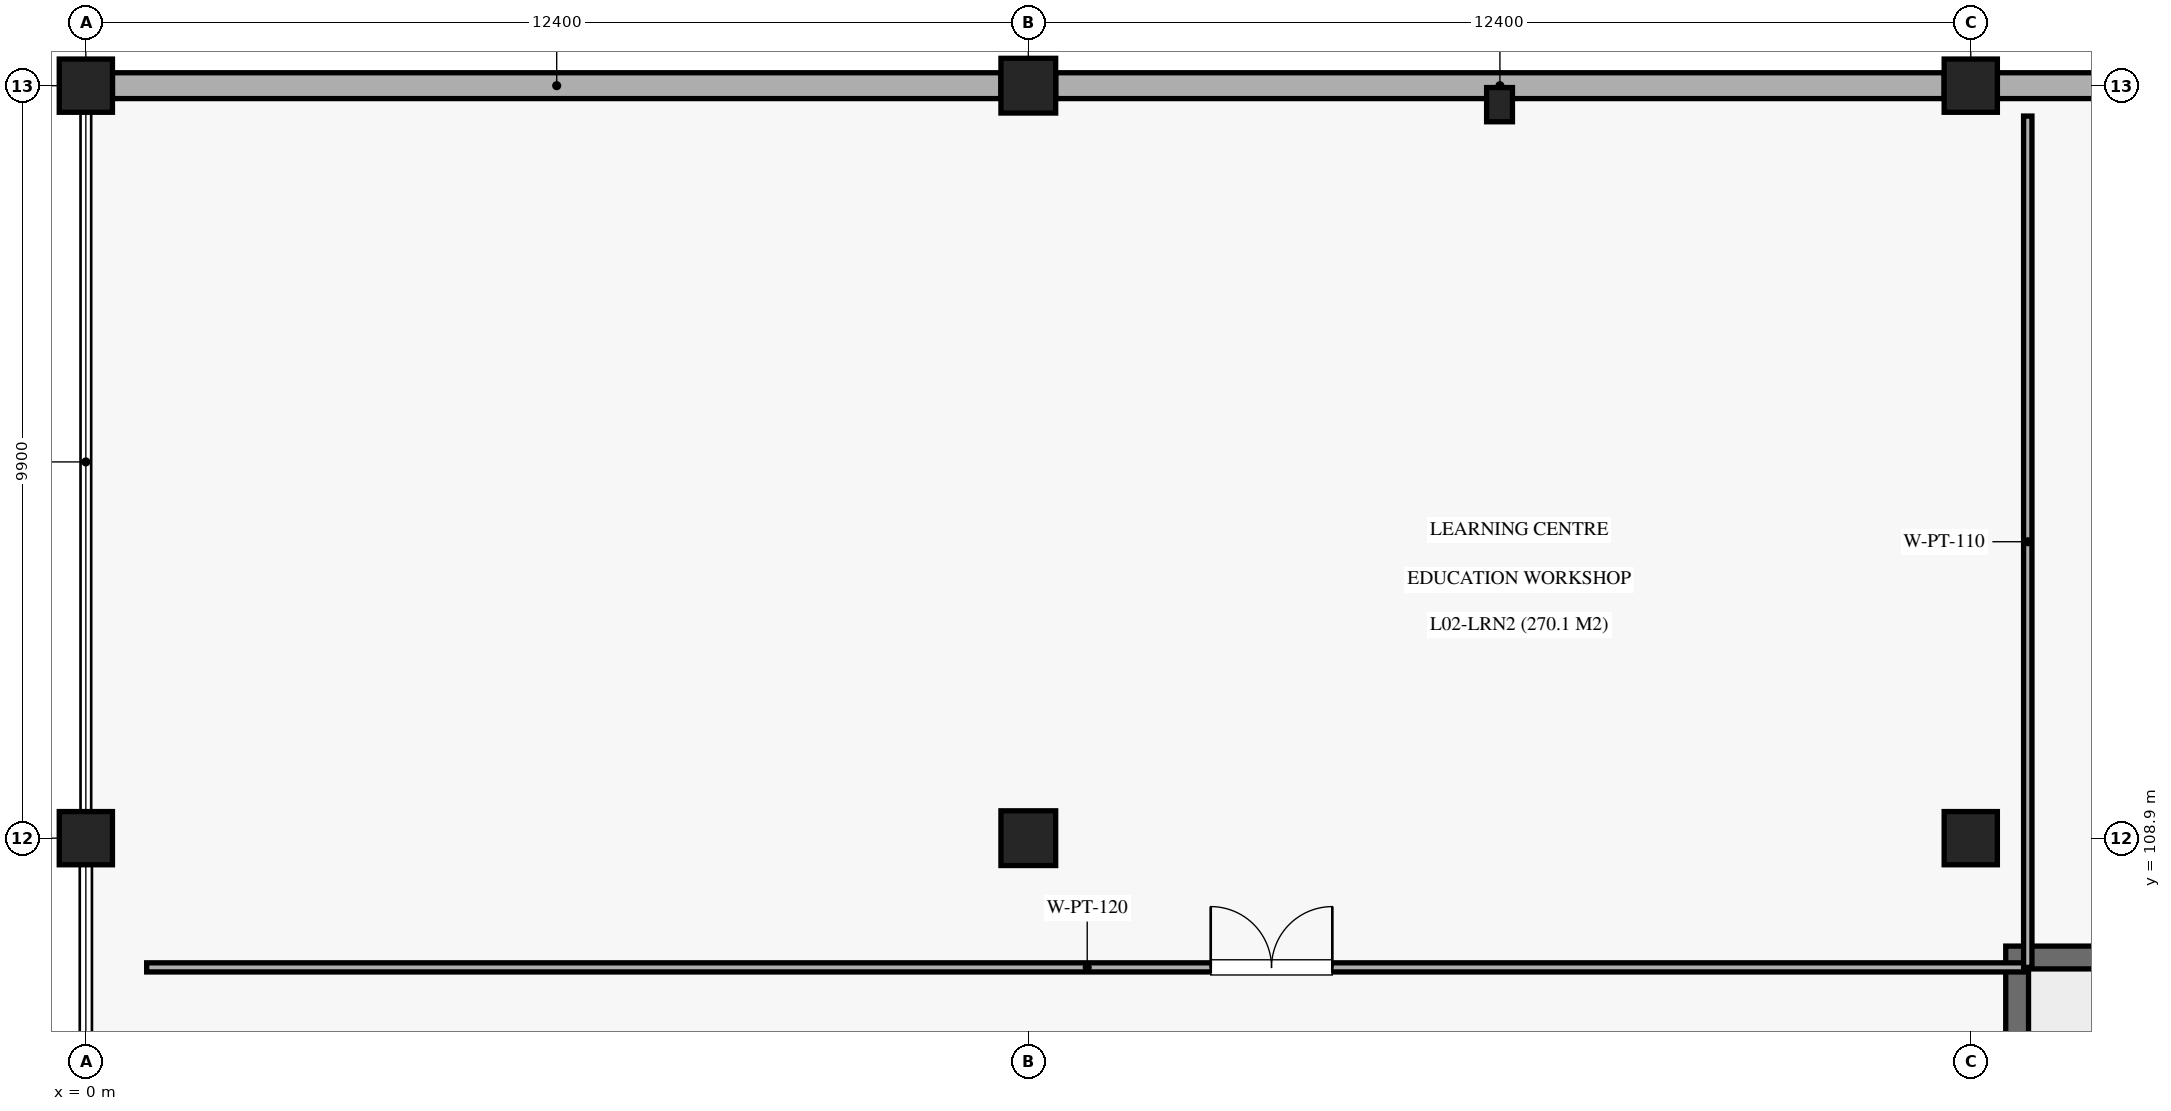
"""IFC4 building model, lengths in metres.
Left out: names, types, materials, properties, quantities, classifications, styles, units other than length and angle.
Written with IfcOpenShell. Run it as: python <this file> out.ifc"""

import sys

from ifc_helpers import new_model, si_unit, direction, frame, frame_2d, origin, origin_2d, place, context, subcontext, project, spatial, rectangle, circle, extrude, element, fill, save


model = new_model("IFC4")
c1 = context("Model", 3, precision=1e-05, world=origin(), true_north=direction((0.0, 1.0)))
c2 = subcontext(c1, "Body", "Model", "MODEL_VIEW")
j1 = project(units=[si_unit("LENGTHUNIT", "METRE"), si_unit("PLANEANGLEUNIT", "RADIAN")], contexts=[c1])
p1 = place(None, origin())
s1 = spatial("IfcSite", under=j1, at=p1, CompositionType="ELEMENT")
p2 = place(p1, origin())
s2 = spatial("IfcBuilding", under=s1, at=p2, CompositionType="ELEMENT")
p3 = place(p2, frame((0.0, 0.0, 10.88)))
s3 = spatial("IfcBuildingStorey", under=s2, at=p3, CompositionType="ELEMENT", Elevation=10.88)
for number, where, z_axis, x_axis in (
    (1, (0.0, 108.9, 0.0), (0.0, 0.0, 1.0), (1.0, 0.0, 0.0)),
    (2, (0.0, 118.8, 0.0), (0.0, 0.0, 1.0), (1.0, 0.0, 0.0)),
):
    element("IfcColumn", number, at=place(p3, frame(where, z_axis=z_axis, x_axis=x_axis)), inside=s3, PredefinedType="COLUMN", context=c2, shape_type="SweptSolid", body=[
        extrude(rectangle(XDim=0.7, YDim=0.7, at=origin_2d()), origin(), (0.0, 0.0, 1.0), 5.44),
    ])
for number, where, z_axis, x_axis in (
    (3, (12.4, 108.9, 0.0), (0.0, 0.0, 1.0), (1.0, 0.0, 0.0)),
    (4, (12.4, 118.8, 0.0), (0.0, 0.0, 1.0), (1.0, 0.0, 0.0)),
):
    element("IfcColumn", number, at=place(p3, frame(where, z_axis=z_axis, x_axis=x_axis)), inside=s3, PredefinedType="COLUMN", context=c2, shape_type="SweptSolid", body=[
        extrude(circle(Radius=0.36, at=origin_2d()), origin(), (0.0, 0.0, 1.0), 5.44),
    ])
for number, where, z_axis, x_axis in (
    (5, (24.8, 108.9, 0.0), (0.0, 0.0, 1.0), (1.0, 0.0, 0.0)),
    (6, (24.8, 118.8, 0.0), (0.0, 0.0, 1.0), (1.0, 0.0, 0.0)),
):
    element("IfcColumn", number, at=place(p3, frame(where, z_axis=z_axis, x_axis=x_axis)), inside=s3, PredefinedType="COLUMN", context=c2, shape_type="SweptSolid", body=[
        extrude(rectangle(XDim=0.7, YDim=0.7, at=origin_2d()), origin(), (0.0, 0.0, 1.0), 5.44),
    ])
p4 = place(p3, frame((18.6, 118.55, 0.0), z_axis=(0.0, 0.0, 1.0), x_axis=(1.0, 0.0, 0.0)))
e7 = element("IfcColumn", 7, at=p4, inside=s3, PredefinedType="PILASTER", context=c2, shape_type="SweptSolid", body=[
    extrude(rectangle(XDim=0.34, YDim=0.45, at=origin_2d()), origin(), (0.0, 0.0, 1.0), 5.44),
])
for number, where, z_axis, x_axis in (
    (8, (0.35, 118.8, 0.0), (0.0, 0.0, 1.0), (1.0, 0.0, 0.0)),
    (9, (12.76, 118.8, 0.0), (0.0, 0.0, 1.0), (1.0, 0.0, 0.0)),
):
    element("IfcWall", number, at=place(p3, frame(where, z_axis=z_axis, x_axis=x_axis)), inside=s3, PredefinedType="SOLIDWALL", context=c2, shape_type="SweptSolid", body=[
        extrude(rectangle(XDim=11.69, YDim=0.34, at=frame_2d((5.845, 0.0))), origin(), (0.0, 0.0, 1.0), 4.38),
    ])
p5 = place(p3, frame((25.15, 118.8, 0.0), z_axis=(0.0, 0.0, 1.0), x_axis=(1.0, 0.0, 0.0)))
e10 = element("IfcWall", 10, at=p5, inside=s3, PredefinedType="SOLIDWALL", context=c2, shape_type="SweptSolid", body=[
    extrude(rectangle(XDim=11.7, YDim=0.34, at=frame_2d((5.85, 0.0))), origin(), (0.0, 0.0, 1.0), 4.38),
])
p6 = place(p3, frame((25.26, 107.33, 0.0), z_axis=(0.0, 0.0, 1.0), x_axis=(1.0, 0.0, 0.0)))
e11 = element("IfcWall", 11, at=p6, inside=s3, PredefinedType="SHEAR", context=c2, shape_type="SweptSolid", body=[
    extrude(rectangle(XDim=7.08, YDim=0.3, at=frame_2d((3.54, 0.0))), origin(), (0.0, 0.0, 1.0), 5.16),
])
p7 = place(p3, frame((25.41, 100.7, 0.0), z_axis=(0.0, 0.0, 1.0), x_axis=(0.0, 1.0, 0.0)))
e12 = element("IfcWall", 12, at=p7, inside=s3, PredefinedType="SHEAR", context=c2, shape_type="SweptSolid", body=[
    extrude(rectangle(XDim=6.48, YDim=0.3, at=frame_2d((3.24, 0.0))), origin(), (0.0, 0.0, 1.0), 5.16),
])
p8 = place(p3, frame((0.8, 107.2, 0.0), z_axis=(0.0, 0.0, 1.0), x_axis=(1.0, 0.0, 0.0)))
e13 = element("IfcWall", 13, at=p8, inside=s3, PredefinedType="PARTITIONING", context=c2, shape_type="SweptSolid", body=[
    extrude(rectangle(XDim=24.75, YDim=0.12, at=frame_2d((12.375, 0.0))), origin(), (0.0, 0.0, 1.0), 4.28),
])
p9 = place(p8, frame((14.0, 0.0, 0.0)))
e14 = element("IfcOpeningElement", 14, at=p9, cuts=e13, PredefinedType="OPENING", context=c2, shape_type="SweptSolid", body=[
    extrude(rectangle(XDim=1.6, YDim=2.25, at=frame_2d((0.8, 1.125))), frame((0.0, 0.07, 0.0), z_axis=(0.0, -1.0, 0.0), x_axis=(1.0, 0.0, 0.0)), (0.0, 0.0, 1.0), 0.14),
])
p10 = place(p3, frame((25.55, 107.2, 0.0), z_axis=(0.0, 0.0, 1.0), x_axis=(0.0, 1.0, 0.0)))
e15 = element("IfcWall", 15, at=p10, inside=s3, PredefinedType="PARTITIONING", context=c2, shape_type="SweptSolid", body=[
    extrude(rectangle(XDim=11.2, YDim=0.11, at=frame_2d((5.6, 0.0))), origin(), (0.0, 0.0, 1.0), 4.28),
])
p11 = place(p9, origin())
e16 = element("IfcDoor", 16, at=p11, inside=s3, OperationType="DOUBLE_DOOR_SINGLE_SWING", PredefinedType="DOOR", context=c2, shape_type="SweptSolid", body=[
    extrude(rectangle(XDim=1.6, YDim=2.25, at=frame_2d((0.8, 1.125))), frame((0.0, 0.025, 0.0), z_axis=(0.0, -1.0, 0.0), x_axis=(1.0, 0.0, 0.0)), (0.0, 0.0, 1.0), 0.05),
])
fill(e14, e16)
save(model, sys.argv[1])
